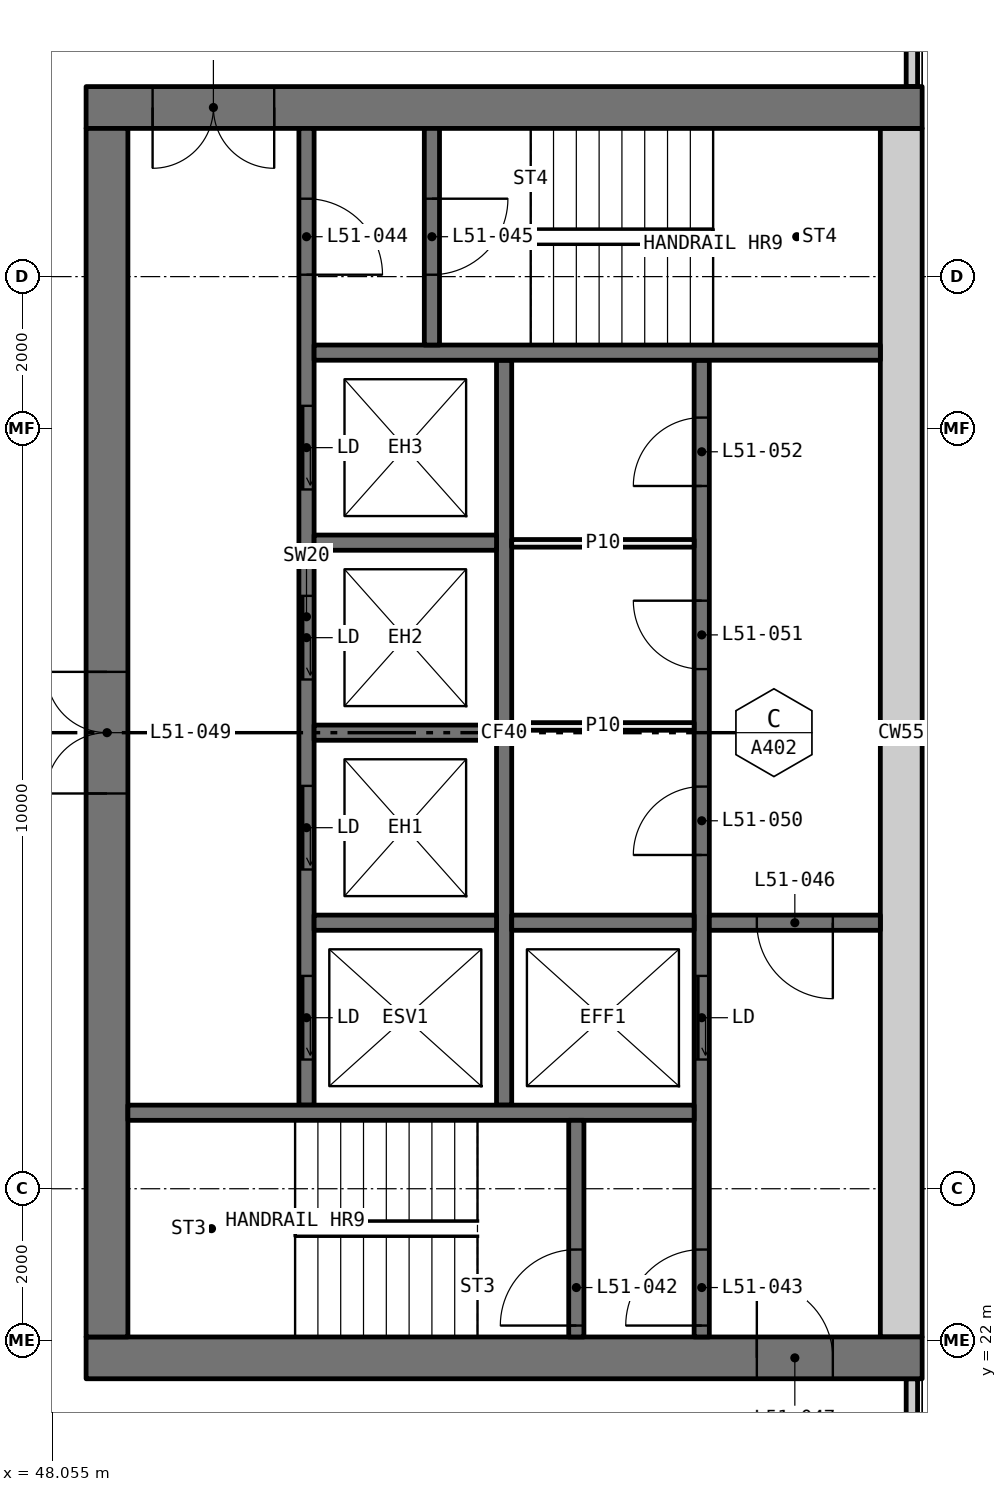
"""IFC4 building model, lengths in metres.
Left out: names, types, materials, properties, quantities, classifications, styles, units other than length and angle.
Written with IfcOpenShell. Run it as: python <this file> out.ifc"""

import sys

from ifc_helpers import new_model, si_unit, direction, frame, frame_2d, origin, place, context, subcontext, project, spatial, rectangle, extrude, element, fill, save


model = new_model("IFC4")
c1 = context("Model", 3, precision=1e-05, world=origin(), true_north=direction((0.0, 1.0)))
c2 = subcontext(c1, "Body", "Model", "MODEL_VIEW")
j1 = project(units=[si_unit("LENGTHUNIT", "METRE"), si_unit("PLANEANGLEUNIT", "RADIAN")], contexts=[c1])
p1 = place(None, origin())
s1 = spatial("IfcSite", under=j1, at=p1, CompositionType="ELEMENT")
p2 = place(p1, origin())
s2 = spatial("IfcBuilding", under=s1, at=p2, CompositionType="ELEMENT")
p3 = place(p2, frame((0.0, 0.0, 192.75)))
s3 = spatial("IfcBuildingStorey", under=s2, at=p3, CompositionType="ELEMENT", Elevation=192.75)
for number, where, z_axis, x_axis in (
    (1, (59.365, 18.71, 0.0), (0.0, 0.0, 1.0), (0.0, 1.0, 0.0)),
    (2, (59.365, 38.5, 0.0), (0.0, 0.0, 1.0), (0.0, 1.0, 0.0)),
):
    element("IfcWall", number, at=place(p3, frame(where, z_axis=z_axis, x_axis=x_axis)), inside=s3, PredefinedType="ELEMENTEDWALL", context=c2, shape_type="SweptSolid", body=[
        extrude(rectangle(XDim=2.79, YDim=0.15, at=frame_2d((1.395, 0.0))), origin(), (0.0, 0.0, 1.0), 3.05),
    ])
p4 = place(p3, frame((59.5, 21.775, 0.0), z_axis=(0.0, 0.0, 1.0), x_axis=(-1.0, 0.0, 0.0)))
e3 = element("IfcWall", 3, at=p4, inside=s3, PredefinedType="SHEAR", context=c2, shape_type="SweptSolid", body=[
    extrude(rectangle(XDim=11.0, YDim=0.55, at=frame_2d((5.5, 0.0))), origin(), (0.0, 0.0, 1.0), 3.05),
])
p5 = place(p4, frame((1.175, 0.0, 0.0)))
e4 = element("IfcOpeningElement", 4, at=p5, cuts=e3, PredefinedType="OPENING", context=c2, shape_type="SweptSolid", body=[
    extrude(rectangle(XDim=1.0, YDim=2.1, at=frame_2d((0.5, 1.05))), frame((0.0, 0.285, 0.0), z_axis=(0.0, -1.0, 0.0), x_axis=(1.0, 0.0, 0.0)), (0.0, 0.0, 1.0), 0.57),
])
p6 = place(p3, frame((59.5, 38.225, 0.0), z_axis=(0.0, 0.0, 1.0), x_axis=(-1.0, 0.0, 0.0)))
e5 = element("IfcWall", 5, at=p6, inside=s3, PredefinedType="SHEAR", context=c2, shape_type="SweptSolid", body=[
    extrude(rectangle(XDim=11.0, YDim=0.55, at=frame_2d((5.5, 0.0))), origin(), (0.0, 0.0, 1.0), 3.05),
])
p7 = place(p6, frame((8.525, 0.0, 0.0)))
e6 = element("IfcOpeningElement", 6, at=p7, cuts=e5, PredefinedType="OPENING", context=c2, shape_type="SweptSolid", body=[
    extrude(rectangle(XDim=1.6, YDim=2.1, at=frame_2d((0.8, 1.05))), frame((0.0, 0.285, 0.0), z_axis=(0.0, -1.0, 0.0), x_axis=(1.0, 0.0, 0.0)), (0.0, 0.0, 1.0), 0.57),
])
p8 = place(p3, frame((59.225, 22.05, 0.0), z_axis=(0.0, 0.0, 1.0), x_axis=(0.0, 1.0, 0.0)))
e7 = element("IfcWall", 7, at=p8, inside=s3, PredefinedType="SHEAR", context=c2, shape_type="SweptSolid", body=[
    extrude(rectangle(XDim=15.9, YDim=0.55, at=frame_2d((7.95, 0.0))), origin(), (0.0, 0.0, 1.0), 3.05),
])
p9 = place(p3, frame((48.775, 22.05, 0.0), z_axis=(0.0, 0.0, 1.0), x_axis=(0.0, 1.0, 0.0)))
e8 = element("IfcWall", 8, at=p9, inside=s3, PredefinedType="SHEAR", context=c2, shape_type="SweptSolid", body=[
    extrude(rectangle(XDim=15.9, YDim=0.55, at=frame_2d((7.95, 0.0))), origin(), (0.0, 0.0, 1.0), 3.05),
])
p10 = place(p9, frame((7.15, 0.0, 0.0)))
e9 = element("IfcOpeningElement", 9, at=p10, cuts=e8, PredefinedType="OPENING", context=c2, shape_type="SweptSolid", body=[
    extrude(rectangle(XDim=1.6, YDim=2.1, at=frame_2d((0.8, 1.05))), frame((0.0, 0.285, 0.0), z_axis=(0.0, -1.0, 0.0), x_axis=(1.0, 0.0, 0.0)), (0.0, 0.0, 1.0), 0.57),
])
p11 = place(p3, frame((56.6, 22.05, 0.0), z_axis=(0.0, 0.0, 1.0), x_axis=(0.0, 1.0, 0.0)))
e10 = element("IfcWall", 10, at=p11, inside=s3, PredefinedType="SOLIDWALL", context=c2, shape_type="SweptSolid", body=[
    extrude(rectangle(XDim=12.85, YDim=0.2, at=frame_2d((6.425, 0.0))), origin(), (0.0, 0.0, 1.0), 3.05),
])
p12 = place(p11, frame((3.65, 0.0, 0.0)))
e11 = element("IfcOpeningElement", 11, at=p12, cuts=e10, PredefinedType="OPENING", context=c2, shape_type="SweptSolid", body=[
    extrude(rectangle(XDim=1.1, YDim=2.1, at=frame_2d((0.55, 1.05))), frame((0.0, 0.11, 0.0), z_axis=(0.0, -1.0, 0.0), x_axis=(1.0, 0.0, 0.0)), (0.0, 0.0, 1.0), 0.22),
])
p13 = place(p11, frame((0.15, 0.0, 0.0)))
e12 = element("IfcOpeningElement", 12, at=p13, cuts=e10, PredefinedType="OPENING", context=c2, shape_type="SweptSolid", body=[
    extrude(rectangle(XDim=1.0, YDim=2.1, at=frame_2d((0.5, 1.05))), frame((0.0, 0.11, 0.0), z_axis=(0.0, -1.0, 0.0), x_axis=(1.0, 0.0, 0.0)), (0.0, 0.0, 1.0), 0.22),
])
p14 = place(p11, frame((6.341, 0.0, 0.0)))
e13 = element("IfcOpeningElement", 13, at=p14, cuts=e10, PredefinedType="OPENING", context=c2, shape_type="SweptSolid", body=[
    extrude(rectangle(XDim=0.9, YDim=2.1, at=frame_2d((0.45, 1.05))), frame((0.0, 0.11, 0.0), z_axis=(0.0, -1.0, 0.0), x_axis=(1.0, 0.0, 0.0)), (0.0, 0.0, 1.0), 0.22),
])
p15 = place(p11, frame((8.787, 0.0, 0.0)))
e14 = element("IfcOpeningElement", 14, at=p15, cuts=e10, PredefinedType="OPENING", context=c2, shape_type="SweptSolid", body=[
    extrude(rectangle(XDim=0.9, YDim=2.1, at=frame_2d((0.45, 1.05))), frame((0.0, 0.11, 0.0), z_axis=(0.0, -1.0, 0.0), x_axis=(1.0, 0.0, 0.0)), (0.0, 0.0, 1.0), 0.22),
])
p16 = place(p11, frame((11.196, 0.0, 0.0)))
e15 = element("IfcOpeningElement", 15, at=p16, cuts=e10, PredefinedType="OPENING", context=c2, shape_type="SweptSolid", body=[
    extrude(rectangle(XDim=0.9, YDim=2.1, at=frame_2d((0.45, 1.05))), frame((0.0, 0.11, 0.0), z_axis=(0.0, -1.0, 0.0), x_axis=(1.0, 0.0, 0.0)), (0.0, 0.0, 1.0), 0.22),
])
p17 = place(p3, frame((51.4, 25.1, 0.0), z_axis=(0.0, 0.0, 1.0), x_axis=(0.0, 1.0, 0.0)))
e16 = element("IfcWall", 16, at=p17, inside=s3, PredefinedType="SOLIDWALL", context=c2, shape_type="SweptSolid", body=[
    extrude(rectangle(XDim=12.85, YDim=0.2, at=frame_2d((6.425, 0.0))), origin(), (0.0, 0.0, 1.0), 3.05),
])
p18 = place(p17, frame((0.6, 0.0, 0.0)))
e17 = element("IfcOpeningElement", 17, at=p18, cuts=e16, PredefinedType="OPENING", context=c2, shape_type="SweptSolid", body=[
    extrude(rectangle(XDim=1.1, YDim=2.1, at=frame_2d((0.55, 1.05))), frame((0.0, 0.11, 0.0), z_axis=(0.0, -1.0, 0.0), x_axis=(1.0, 0.0, 0.0)), (0.0, 0.0, 1.0), 0.22),
])
p19 = place(p17, frame((3.1, 0.0, 0.0)))
e18 = element("IfcOpeningElement", 18, at=p19, cuts=e16, PredefinedType="OPENING", context=c2, shape_type="SweptSolid", body=[
    extrude(rectangle(XDim=1.1, YDim=2.1, at=frame_2d((0.55, 1.05))), frame((0.0, 0.11, 0.0), z_axis=(0.0, -1.0, 0.0), x_axis=(1.0, 0.0, 0.0)), (0.0, 0.0, 1.0), 0.22),
])
p20 = place(p17, frame((5.6, 0.0, 0.0)))
e19 = element("IfcOpeningElement", 19, at=p20, cuts=e16, PredefinedType="OPENING", context=c2, shape_type="SweptSolid", body=[
    extrude(rectangle(XDim=1.1, YDim=2.1, at=frame_2d((0.55, 1.05))), frame((0.0, 0.11, 0.0), z_axis=(0.0, -1.0, 0.0), x_axis=(1.0, 0.0, 0.0)), (0.0, 0.0, 1.0), 0.22),
])
p21 = place(p17, frame((8.1, 0.0, 0.0)))
e20 = element("IfcOpeningElement", 20, at=p21, cuts=e16, PredefinedType="OPENING", context=c2, shape_type="SweptSolid", body=[
    extrude(rectangle(XDim=1.1, YDim=2.1, at=frame_2d((0.55, 1.05))), frame((0.0, 0.11, 0.0), z_axis=(0.0, -1.0, 0.0), x_axis=(1.0, 0.0, 0.0)), (0.0, 0.0, 1.0), 0.22),
])
p22 = place(p17, frame((10.925, 0.0, 0.0)))
e21 = element("IfcOpeningElement", 21, at=p22, cuts=e16, PredefinedType="OPENING", context=c2, shape_type="SweptSolid", body=[
    extrude(rectangle(XDim=1.0, YDim=2.1, at=frame_2d((0.5, 1.05))), frame((0.0, 0.11, 0.0), z_axis=(0.0, -1.0, 0.0), x_axis=(1.0, 0.0, 0.0)), (0.0, 0.0, 1.0), 0.22),
])
p23 = place(p3, frame((54.0, 25.1, 0.0), z_axis=(0.0, 0.0, 1.0), x_axis=(0.0, 1.0, 0.0)))
e22 = element("IfcWall", 22, at=p23, inside=s3, PredefinedType="SOLIDWALL", context=c2, shape_type="SweptSolid", body=[
    extrude(rectangle(XDim=9.8, YDim=0.2, at=frame_2d((4.9, 0.0))), origin(), (0.0, 0.0, 1.0), 3.05),
])
for number, where, z_axis, x_axis in (
    (23, (56.5, 25.0, 0.0), (0.0, 0.0, 1.0), (-1.0, 0.0, 0.0)),
    (24, (58.95, 35.0, 0.0), (0.0, 0.0, 1.0), (-1.0, 0.0, 0.0)),
):
    element("IfcWall", number, at=place(p3, frame(where, z_axis=z_axis, x_axis=x_axis)), inside=s3, PredefinedType="SOLIDWALL", context=c2, shape_type="SweptSolid", body=[
        extrude(rectangle(XDim=7.45, YDim=0.2, at=frame_2d((3.725, 0.0))), origin(), (0.0, 0.0, 1.0), 3.05),
    ])
p24 = place(p3, frame((58.95, 27.5, 0.0), z_axis=(0.0, 0.0, 1.0), x_axis=(-1.0, 0.0, 0.0)))
e25 = element("IfcWall", 25, at=p24, inside=s3, PredefinedType="SOLIDWALL", context=c2, shape_type="SweptSolid", body=[
    extrude(rectangle(XDim=2.25, YDim=0.2, at=frame_2d((1.125, 0.0))), origin(), (0.0, 0.0, 1.0), 3.05),
])
p25 = place(p24, frame((0.625, 0.0, 0.0)))
e26 = element("IfcOpeningElement", 26, at=p25, cuts=e25, PredefinedType="OPENING", context=c2, shape_type="SweptSolid", body=[
    extrude(rectangle(XDim=1.0, YDim=2.1, at=frame_2d((0.5, 1.05))), frame((0.0, 0.11, 0.0), z_axis=(0.0, -1.0, 0.0), x_axis=(1.0, 0.0, 0.0)), (0.0, 0.0, 1.0), 0.22),
])
p26 = place(p3, frame((54.95, 22.05, 0.0), z_axis=(0.0, 0.0, 1.0), x_axis=(0.0, 1.0, 0.0)))
e27 = element("IfcWall", 27, at=p26, inside=s3, PredefinedType="SOLIDWALL", context=c2, shape_type="SweptSolid", body=[
    extrude(rectangle(XDim=2.85, YDim=0.2, at=frame_2d((1.425, 0.0))), origin(), (0.0, 0.0, 1.0), 3.05),
])
p27 = place(p26, frame((0.15, 0.0, 0.0)))
e28 = element("IfcOpeningElement", 28, at=p27, cuts=e27, PredefinedType="OPENING", context=c2, shape_type="SweptSolid", body=[
    extrude(rectangle(XDim=1.0, YDim=2.1, at=frame_2d((0.5, 1.05))), frame((0.0, 0.11, 0.0), z_axis=(0.0, -1.0, 0.0), x_axis=(1.0, 0.0, 0.0)), (0.0, 0.0, 1.0), 0.22),
])
p28 = place(p3, frame((53.05, 35.1, 0.0), z_axis=(0.0, 0.0, 1.0), x_axis=(0.0, 1.0, 0.0)))
e29 = element("IfcWall", 29, at=p28, inside=s3, PredefinedType="SOLIDWALL", context=c2, shape_type="SweptSolid", body=[
    extrude(rectangle(XDim=2.85, YDim=0.2, at=frame_2d((1.425, 0.0))), origin(), (0.0, 0.0, 1.0), 3.05),
])
p29 = place(p28, frame((0.925, 0.0, 0.0)))
e30 = element("IfcOpeningElement", 30, at=p29, cuts=e29, PredefinedType="OPENING", context=c2, shape_type="SweptSolid", body=[
    extrude(rectangle(XDim=1.0, YDim=2.1, at=frame_2d((0.5, 1.05))), frame((0.0, 0.11, 0.0), z_axis=(0.0, -1.0, 0.0), x_axis=(1.0, 0.0, 0.0)), (0.0, 0.0, 1.0), 0.22),
])
for number, where, z_axis, x_axis in (
    (31, (56.5, 27.5, 0.0), (0.0, 0.0, 1.0), (-1.0, 0.0, 0.0)),
    (32, (53.9, 27.5, 0.0), (0.0, 0.0, 1.0), (-1.0, 0.0, 0.0)),
    (33, (53.9, 30.0, 0.0), (0.0, 0.0, 1.0), (-1.0, 0.0, 0.0)),
    (34, (53.9, 32.5, 0.0), (0.0, 0.0, 1.0), (-1.0, 0.0, 0.0)),
):
    element("IfcWall", number, at=place(p3, frame(where, z_axis=z_axis, x_axis=x_axis)), inside=s3, PredefinedType="SOLIDWALL", context=c2, shape_type="SweptSolid", body=[
        extrude(rectangle(XDim=2.4, YDim=0.2, at=frame_2d((1.2, 0.0))), origin(), (0.0, 0.0, 1.0), 3.05),
    ])
for number, where, z_axis, x_axis in (
    (35, (56.5, 30.082, 0.0), (0.0, 0.0, 1.0), (-1.0, 0.0, 0.0)),
    (36, (56.5, 32.491, 0.0), (0.0, 0.0, 1.0), (-1.0, 0.0, 0.0)),
):
    element("IfcWall", number, at=place(p3, frame(where, z_axis=z_axis, x_axis=x_axis)), inside=s3, PredefinedType="PARTITIONING", context=c2, shape_type="SweptSolid", body=[
        extrude(rectangle(XDim=2.4, YDim=0.1, at=frame_2d((1.2, 0.0))), origin(), (0.0, 0.0, 1.0), 3.05),
    ])
p30 = place(p18, origin())
e37 = element("IfcDoor", 37, at=p30, inside=s3, OperationType="SLIDING_TO_LEFT", PredefinedType="DOOR", context=c2, shape_type="SweptSolid", body=[
    extrude(rectangle(XDim=1.1, YDim=2.1, at=frame_2d((0.55, 1.05))), frame((0.0, 0.025, 0.0), z_axis=(0.0, -1.0, 0.0), x_axis=(1.0, 0.0, 0.0)), (0.0, 0.0, 1.0), 0.05),
])
fill(e17, e37)
p31 = place(p19, origin())
e38 = element("IfcDoor", 38, at=p31, inside=s3, OperationType="SLIDING_TO_LEFT", PredefinedType="DOOR", context=c2, shape_type="SweptSolid", body=[
    extrude(rectangle(XDim=1.1, YDim=2.1, at=frame_2d((0.55, 1.05))), frame((0.0, 0.025, 0.0), z_axis=(0.0, -1.0, 0.0), x_axis=(1.0, 0.0, 0.0)), (0.0, 0.0, 1.0), 0.05),
])
fill(e18, e38)
p32 = place(p20, origin())
e39 = element("IfcDoor", 39, at=p32, inside=s3, OperationType="SLIDING_TO_LEFT", PredefinedType="DOOR", context=c2, shape_type="SweptSolid", body=[
    extrude(rectangle(XDim=1.1, YDim=2.1, at=frame_2d((0.55, 1.05))), frame((0.0, 0.025, 0.0), z_axis=(0.0, -1.0, 0.0), x_axis=(1.0, 0.0, 0.0)), (0.0, 0.0, 1.0), 0.05),
])
fill(e19, e39)
p33 = place(p21, origin())
e40 = element("IfcDoor", 40, at=p33, inside=s3, OperationType="SLIDING_TO_LEFT", PredefinedType="DOOR", context=c2, shape_type="SweptSolid", body=[
    extrude(rectangle(XDim=1.1, YDim=2.1, at=frame_2d((0.55, 1.05))), frame((0.0, 0.025, 0.0), z_axis=(0.0, -1.0, 0.0), x_axis=(1.0, 0.0, 0.0)), (0.0, 0.0, 1.0), 0.05),
])
fill(e20, e40)
p34 = place(p12, origin())
e41 = element("IfcDoor", 41, at=p34, inside=s3, OperationType="SLIDING_TO_LEFT", PredefinedType="DOOR", context=c2, shape_type="SweptSolid", body=[
    extrude(rectangle(XDim=1.1, YDim=2.1, at=frame_2d((0.55, 1.05))), frame((0.0, 0.025, 0.0), z_axis=(0.0, -1.0, 0.0), x_axis=(1.0, 0.0, 0.0)), (0.0, 0.0, 1.0), 0.05),
])
fill(e11, e41)
p35 = place(p27, origin())
e42 = element("IfcDoor", 42, at=p35, inside=s3, OperationType="SINGLE_SWING_RIGHT", PredefinedType="DOOR", context=c2, shape_type="SweptSolid", body=[
    extrude(rectangle(XDim=1.0, YDim=2.1, at=frame_2d((0.5, 1.05))), frame((0.0, 0.025, 0.0), z_axis=(0.0, -1.0, 0.0), x_axis=(1.0, 0.0, 0.0)), (0.0, 0.0, 1.0), 0.05),
])
fill(e28, e42)
p36 = place(p13, origin())
e43 = element("IfcDoor", 43, at=p36, inside=s3, OperationType="SINGLE_SWING_RIGHT", PredefinedType="DOOR", context=c2, shape_type="SweptSolid", body=[
    extrude(rectangle(XDim=1.0, YDim=2.1, at=frame_2d((0.5, 1.05))), frame((0.0, 0.025, 0.0), z_axis=(0.0, -1.0, 0.0), x_axis=(1.0, 0.0, 0.0)), (0.0, 0.0, 1.0), 0.05),
])
fill(e12, e43)
p37 = place(p22, frame((1.0, 0.0, 0.0), x_axis=(-1.0, 0.0, 0.0)))
e44 = element("IfcDoor", 44, at=p37, inside=s3, OperationType="SINGLE_SWING_LEFT", PredefinedType="DOOR", context=c2, shape_type="SweptSolid", body=[
    extrude(rectangle(XDim=1.0, YDim=2.1, at=frame_2d((0.5, 1.05))), frame((0.0, 0.025, 0.0), z_axis=(0.0, -1.0, 0.0), x_axis=(1.0, 0.0, 0.0)), (0.0, 0.0, 1.0), 0.05),
])
fill(e21, e44)
p38 = place(p29, frame((1.0, 0.0, 0.0), x_axis=(-1.0, 0.0, 0.0)))
e45 = element("IfcDoor", 45, at=p38, inside=s3, OperationType="SINGLE_SWING_RIGHT", PredefinedType="DOOR", context=c2, shape_type="SweptSolid", body=[
    extrude(rectangle(XDim=1.0, YDim=2.1, at=frame_2d((0.5, 1.05))), frame((0.0, 0.025, 0.0), z_axis=(0.0, -1.0, 0.0), x_axis=(1.0, 0.0, 0.0)), (0.0, 0.0, 1.0), 0.05),
])
fill(e30, e45)
p39 = place(p25, origin())
e46 = element("IfcDoor", 46, at=p39, inside=s3, OperationType="SINGLE_SWING_RIGHT", PredefinedType="DOOR", context=c2, shape_type="SweptSolid", body=[
    extrude(rectangle(XDim=1.0, YDim=2.1, at=frame_2d((0.5, 1.05))), frame((0.0, 0.025, 0.0), z_axis=(0.0, -1.0, 0.0), x_axis=(1.0, 0.0, 0.0)), (0.0, 0.0, 1.0), 0.05),
])
fill(e26, e46)
p40 = place(p5, frame((1.0, 0.0, 0.0), x_axis=(-1.0, 0.0, 0.0)))
e47 = element("IfcDoor", 47, at=p40, inside=s3, OperationType="SINGLE_SWING_RIGHT", PredefinedType="DOOR", context=c2, shape_type="SweptSolid", body=[
    extrude(rectangle(XDim=1.0, YDim=2.1, at=frame_2d((0.5, 1.05))), frame((0.0, 0.025, 0.0), z_axis=(0.0, -1.0, 0.0), x_axis=(1.0, 0.0, 0.0)), (0.0, 0.0, 1.0), 0.05),
])
fill(e4, e47)
p41 = place(p7, origin())
e48 = element("IfcDoor", 48, at=p41, inside=s3, OperationType="DOUBLE_DOOR_SINGLE_SWING", PredefinedType="DOOR", context=c2, shape_type="SweptSolid", body=[
    extrude(rectangle(XDim=1.6, YDim=2.1, at=frame_2d((0.8, 1.05))), frame((0.0, 0.025, 0.0), z_axis=(0.0, -1.0, 0.0), x_axis=(1.0, 0.0, 0.0)), (0.0, 0.0, 1.0), 0.05),
])
fill(e6, e48)
p42 = place(p10, origin())
e49 = element("IfcDoor", 49, at=p42, inside=s3, OperationType="DOUBLE_DOOR_SINGLE_SWING", PredefinedType="DOOR", context=c2, shape_type="SweptSolid", body=[
    extrude(rectangle(XDim=1.6, YDim=2.1, at=frame_2d((0.8, 1.05))), frame((0.0, 0.025, 0.0), z_axis=(0.0, -1.0, 0.0), x_axis=(1.0, 0.0, 0.0)), (0.0, 0.0, 1.0), 0.05),
])
fill(e9, e49)
p43 = place(p14, origin())
e50 = element("IfcDoor", 50, at=p43, inside=s3, OperationType="SINGLE_SWING_RIGHT", PredefinedType="DOOR", context=c2, shape_type="SweptSolid", body=[
    extrude(rectangle(XDim=0.9, YDim=2.1, at=frame_2d((0.45, 1.05))), frame((0.0, 0.025, 0.0), z_axis=(0.0, -1.0, 0.0), x_axis=(1.0, 0.0, 0.0)), (0.0, 0.0, 1.0), 0.05),
])
fill(e13, e50)
p44 = place(p15, origin())
e51 = element("IfcDoor", 51, at=p44, inside=s3, OperationType="SINGLE_SWING_LEFT", PredefinedType="DOOR", context=c2, shape_type="SweptSolid", body=[
    extrude(rectangle(XDim=0.9, YDim=2.1, at=frame_2d((0.45, 1.05))), frame((0.0, 0.025, 0.0), z_axis=(0.0, -1.0, 0.0), x_axis=(1.0, 0.0, 0.0)), (0.0, 0.0, 1.0), 0.05),
])
fill(e14, e51)
p45 = place(p16, origin())
e52 = element("IfcDoor", 52, at=p45, inside=s3, OperationType="SINGLE_SWING_RIGHT", PredefinedType="DOOR", context=c2, shape_type="SweptSolid", body=[
    extrude(rectangle(XDim=0.9, YDim=2.1, at=frame_2d((0.45, 1.05))), frame((0.0, 0.025, 0.0), z_axis=(0.0, -1.0, 0.0), x_axis=(1.0, 0.0, 0.0)), (0.0, 0.0, 1.0), 0.05),
])
fill(e15, e52)
save(model, sys.argv[1])
